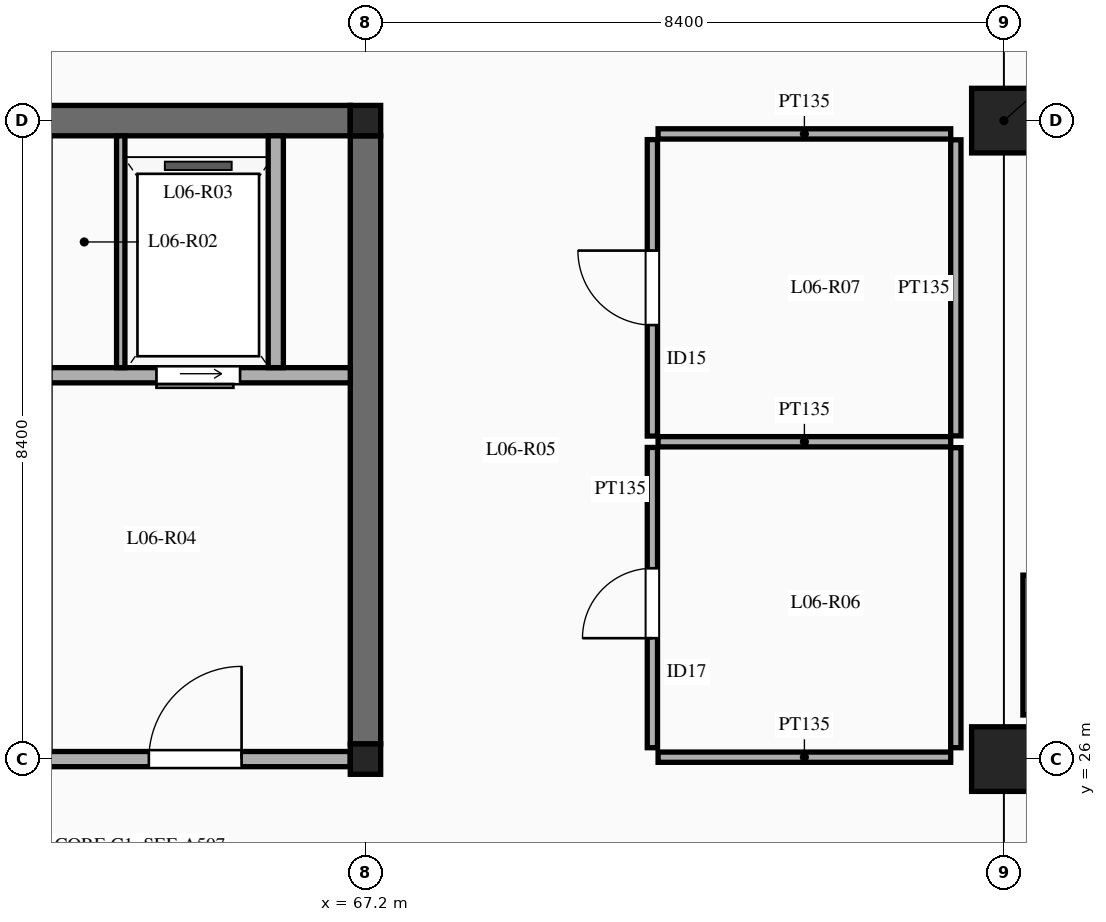
"""IFC4 building model, lengths in metres.
Left out: names, types, materials, properties, quantities, classifications, styles, units other than length and angle.
Written with IfcOpenShell. Run it as: python <this file> out.ifc"""

import sys

from ifc_helpers import new_model, si_unit, direction, frame, frame_2d, origin, origin_2d, place, context, subcontext, project, spatial, rectangle, extrude, element, fill, save


model = new_model("IFC4")
c1 = context("Model", 3, precision=1e-05, world=origin(), true_north=direction((0.0, 1.0)))
c2 = subcontext(c1, "Body", "Model", "MODEL_VIEW")
j1 = project(units=[si_unit("LENGTHUNIT", "METRE"), si_unit("PLANEANGLEUNIT", "RADIAN")], contexts=[c1])
p1 = place(None, origin())
s1 = spatial("IfcSite", under=j1, at=p1, CompositionType="ELEMENT")
p2 = place(p1, origin())
s2 = spatial("IfcBuilding", under=s1, at=p2, CompositionType="ELEMENT")
p3 = place(p2, frame((0.0, 0.0, 28.5)))
s3 = spatial("IfcBuildingStorey", under=s2, at=p3, CompositionType="ELEMENT", Elevation=28.5)
for number, where, z_axis, x_axis in (
    (1, (67.2, 26.0, 0.0), (0.0, 0.0, 1.0), (1.0, 0.0, 0.0)),
    (2, (67.2, 34.4, 0.0), (0.0, 0.0, 1.0), (1.0, 0.0, 0.0)),
):
    element("IfcColumn", number, at=place(p3, frame(where, z_axis=z_axis, x_axis=x_axis)), inside=s3, PredefinedType="COLUMN", context=c2, shape_type="SweptSolid", body=[
        extrude(rectangle(XDim=0.4, YDim=0.4, at=origin_2d()), origin(), (0.0, 0.0, 1.0), 4.5),
    ])
for number, where, z_axis, x_axis in (
    (3, (75.6, 26.0, 0.0), (0.0, 0.0, 1.0), (1.0, 0.0, 0.0)),
    (4, (75.6, 34.4, 0.0), (0.0, 0.0, 1.0), (1.0, 0.0, 0.0)),
):
    element("IfcColumn", number, at=place(p3, frame(where, z_axis=z_axis, x_axis=x_axis)), inside=s3, PredefinedType="COLUMN", context=c2, shape_type="SweptSolid", body=[
        extrude(rectangle(XDim=0.85, YDim=0.85, at=origin_2d()), origin(), (0.0, 0.0, 1.0), 4.5),
    ])
for number, where, z_axis, x_axis in (
    (5, (67.2, 26.2, 0.0), (0.0, 0.0, 1.0), (0.0, 1.0, 0.0)),
    (6, (59.0, 34.4, 0.0), (0.0, 0.0, 1.0), (1.0, 0.0, 0.0)),
):
    element("IfcWall", number, at=place(p3, frame(where, z_axis=z_axis, x_axis=x_axis)), inside=s3, PredefinedType="SHEAR", context=c2, shape_type="SweptSolid", body=[
        extrude(rectangle(XDim=8.0, YDim=0.4, at=frame_2d((4.0, 0.0))), origin(), (0.0, 0.0, 1.0), 4.5),
    ])
p4 = place(p3, frame((59.0, 26.0, 0.0), z_axis=(0.0, 0.0, 1.0), x_axis=(1.0, 0.0, 0.0)))
e7 = element("IfcWall", 7, at=p4, inside=s3, PredefinedType="SOLIDWALL", context=c2, shape_type="SweptSolid", body=[
    extrude(rectangle(XDim=8.0, YDim=0.2, at=frame_2d((4.0, 0.0))), origin(), (0.0, 0.0, 1.0), 3.78),
])
p5 = place(p4, frame((1.55, 0.0, 0.0)))
e8 = element("IfcOpeningElement", 8, at=p5, cuts=e7, PredefinedType="OPENING", context=c2, shape_type="SweptSolid", body=[
    extrude(rectangle(XDim=1.15, YDim=2.15, at=frame_2d((0.575, 1.075))), frame((0.0, 0.11, 0.0), z_axis=(0.0, -1.0, 0.0), x_axis=(1.0, 0.0, 0.0)), (0.0, 0.0, 1.0), 0.22),
])
p6 = place(p4, frame((5.35, 0.0, 0.0)))
e9 = element("IfcOpeningElement", 9, at=p6, cuts=e7, PredefinedType="OPENING", context=c2, shape_type="SweptSolid", body=[
    extrude(rectangle(XDim=1.22, YDim=2.15, at=frame_2d((0.61, 1.075))), frame((0.0, 0.11, 0.0), z_axis=(0.0, -1.0, 0.0), x_axis=(1.0, 0.0, 0.0)), (0.0, 0.0, 1.0), 0.22),
])
p7 = place(p3, frame((63.05, 31.05, 0.0), z_axis=(0.0, 0.0, 1.0), x_axis=(1.0, 0.0, 0.0)))
e10 = element("IfcWall", 10, at=p7, inside=s3, PredefinedType="SOLIDWALL", context=c2, shape_type="SweptSolid", body=[
    extrude(rectangle(XDim=3.95, YDim=0.2, at=frame_2d((1.975, 0.0))), origin(), (0.0, 0.0, 1.0), 4.3),
])
p8 = place(p7, frame((1.4, 0.0, 0.0)))
e11 = element("IfcOpeningElement", 11, at=p8, cuts=e10, PredefinedType="OPENING", context=c2, shape_type="SweptSolid", body=[
    extrude(rectangle(XDim=1.1, YDim=2.15, at=frame_2d((0.55, 1.075))), frame((0.0, 0.11, 0.0), z_axis=(0.0, -1.0, 0.0), x_axis=(1.0, 0.0, 0.0)), (0.0, 0.0, 1.0), 0.22),
])
p9 = place(p3, frame((63.98, 31.15, 0.0), z_axis=(0.0, 0.0, 1.0), x_axis=(0.0, 1.0, 0.0)))
e12 = element("IfcWall", 12, at=p9, inside=s3, PredefinedType="PARTITIONING", context=c2, shape_type="SweptSolid", body=[
    extrude(rectangle(XDim=3.05, YDim=0.11, at=frame_2d((1.525, 0.0))), origin(), (0.0, 0.0, 1.0), 4.3),
])
p10 = place(p3, frame((66.02, 31.15, 0.0), z_axis=(0.0, 0.0, 1.0), x_axis=(0.0, 1.0, 0.0)))
e13 = element("IfcWall", 13, at=p10, inside=s3, PredefinedType="SOLIDWALL", context=c2, shape_type="SweptSolid", body=[
    extrude(rectangle(XDim=3.05, YDim=0.2, at=frame_2d((1.525, 0.0))), origin(), (0.0, 0.0, 1.0), 4.3),
])
p11 = place(p3, frame((75.95, 26.58, 0.0), z_axis=(0.0, 0.0, 1.0), x_axis=(0.0, 1.0, 0.0)))
e14 = element("IfcWall", 14, at=p11, inside=s3, PredefinedType="SOLIDWALL", context=c2, shape_type="SweptSolid", body=[
    extrude(rectangle(XDim=1.84, YDim=0.2, at=frame_2d((0.92, 0.0))), origin(), (0.0, 0.0, 1.0), 3.88),
])
p12 = place(p3, frame((70.975, 26.15, 0.0), z_axis=(0.0, 0.0, 1.0), x_axis=(0.0, 1.0, 0.0)))
e15 = element("IfcWall", 15, at=p12, inside=s3, PredefinedType="PARTITIONING", context=c2, shape_type="SweptSolid", body=[
    extrude(rectangle(XDim=3.95, YDim=0.135, at=frame_2d((1.975, 0.0))), origin(), (0.0, 0.0, 1.0), 3.45),
])
p13 = place(p12, frame((1.441, 0.0, 0.0)))
e16 = element("IfcOpeningElement", 16, at=p13, cuts=e15, PredefinedType="OPENING", context=c2, shape_type="SweptSolid", body=[
    extrude(rectangle(XDim=0.92, YDim=2.12, at=frame_2d((0.46, 1.06))), frame((0.0, 0.077, 0.0), z_axis=(0.0, -1.0, 0.0), x_axis=(1.0, 0.0, 0.0)), (0.0, 0.0, 1.0), 0.155),
])
p14 = place(p3, frame((70.975, 30.25, 0.0), z_axis=(0.0, 0.0, 1.0), x_axis=(0.0, 1.0, 0.0)))
e17 = element("IfcWall", 17, at=p14, inside=s3, PredefinedType="PARTITIONING", context=c2, shape_type="SweptSolid", body=[
    extrude(rectangle(XDim=3.9, YDim=0.135, at=frame_2d((1.95, 0.0))), origin(), (0.0, 0.0, 1.0), 3.45),
])
p15 = place(p14, frame((1.46, 0.0, 0.0)))
e18 = element("IfcOpeningElement", 18, at=p15, cuts=e17, PredefinedType="OPENING", context=c2, shape_type="SweptSolid", body=[
    extrude(rectangle(XDim=0.98, YDim=2.15, at=frame_2d((0.49, 1.075))), frame((0.0, 0.077, 0.0), z_axis=(0.0, -1.0, 0.0), x_axis=(1.0, 0.0, 0.0)), (0.0, 0.0, 1.0), 0.155),
])
for number, where, z_axis, x_axis in (
    (19, (71.05, 30.175, 0.0), (0.0, 0.0, 1.0), (1.0, 0.0, 0.0)),
    (20, (71.05, 26.025, 0.0), (0.0, 0.0, 1.0), (1.0, 0.0, 0.0)),
    (21, (71.05, 34.225, 0.0), (0.0, 0.0, 1.0), (1.0, 0.0, 0.0)),
):
    element("IfcWall", number, at=place(p3, frame(where, z_axis=z_axis, x_axis=x_axis)), inside=s3, PredefinedType="PARTITIONING", context=c2, shape_type="SweptSolid", body=[
        extrude(rectangle(XDim=3.85, YDim=0.135, at=frame_2d((1.925, 0.0))), origin(), (0.0, 0.0, 1.0), 3.45),
    ])
p16 = place(p3, frame((74.968, 26.15, 0.0), z_axis=(0.0, 0.0, 1.0), x_axis=(0.0, 1.0, 0.0)))
e22 = element("IfcWall", 22, at=p16, inside=s3, PredefinedType="PARTITIONING", context=c2, shape_type="SweptSolid", body=[
    extrude(rectangle(XDim=3.948, YDim=0.135, at=frame_2d((1.974, 0.0))), origin(), (0.0, 0.0, 1.0), 3.45),
])
p17 = place(p3, frame((74.968, 30.252, 0.0), z_axis=(0.0, 0.0, 1.0), x_axis=(0.0, 1.0, 0.0)))
e23 = element("IfcWall", 23, at=p17, inside=s3, PredefinedType="PARTITIONING", context=c2, shape_type="SweptSolid", body=[
    extrude(rectangle(XDim=3.895, YDim=0.135, at=frame_2d((1.948, 0.0))), origin(), (0.0, 0.0, 1.0), 3.45),
])
p18 = place(p6, origin())
e24 = element("IfcDoor", 24, at=p18, inside=s3, OperationType="SINGLE_SWING_RIGHT", PredefinedType="DOOR", context=c2, shape_type="SweptSolid", body=[
    extrude(rectangle(XDim=1.22, YDim=2.15, at=frame_2d((0.61, 1.075))), frame((0.0, 0.025, 0.0), z_axis=(0.0, -1.0, 0.0), x_axis=(1.0, 0.0, 0.0)), (0.0, 0.0, 1.0), 0.05),
])
fill(e9, e24)
p19 = place(p8, frame((1.1, 0.0, 0.0), z_axis=(0.0, 0.0, 1.0), x_axis=(-1.0, 0.0, 0.0)))
e25 = element("IfcDoor", 25, at=p19, inside=s3, OperationType="SLIDING_TO_LEFT", PredefinedType="DOOR", context=c2, shape_type="SweptSolid", body=[
    extrude(rectangle(XDim=1.1, YDim=2.15, at=frame_2d((0.55, 1.075))), frame((0.0, 0.025, 0.0), z_axis=(0.0, -1.0, 0.0), x_axis=(1.0, 0.0, 0.0)), (0.0, 0.0, 1.0), 0.05),
])
fill(e11, e25)
p20 = place(p13, origin())
e26 = element("IfcDoor", 26, at=p20, inside=s3, OperationType="SINGLE_SWING_LEFT", PredefinedType="DOOR", context=c2, shape_type="SweptSolid", body=[
    extrude(rectangle(XDim=0.92, YDim=2.12, at=frame_2d((0.46, 1.06))), frame((0.0, 0.025, 0.0), z_axis=(0.0, -1.0, 0.0), x_axis=(1.0, 0.0, 0.0)), (0.0, 0.0, 1.0), 0.05),
])
fill(e16, e26)
p21 = place(p15, origin())
e27 = element("IfcDoor", 27, at=p21, inside=s3, OperationType="SINGLE_SWING_RIGHT", PredefinedType="DOOR", context=c2, shape_type="SweptSolid", body=[
    extrude(rectangle(XDim=0.98, YDim=2.15, at=frame_2d((0.49, 1.075))), frame((0.0, 0.025, 0.0), z_axis=(0.0, -1.0, 0.0), x_axis=(1.0, 0.0, 0.0)), (0.0, 0.0, 1.0), 0.05),
])
fill(e18, e27)
save(model, sys.argv[1])
